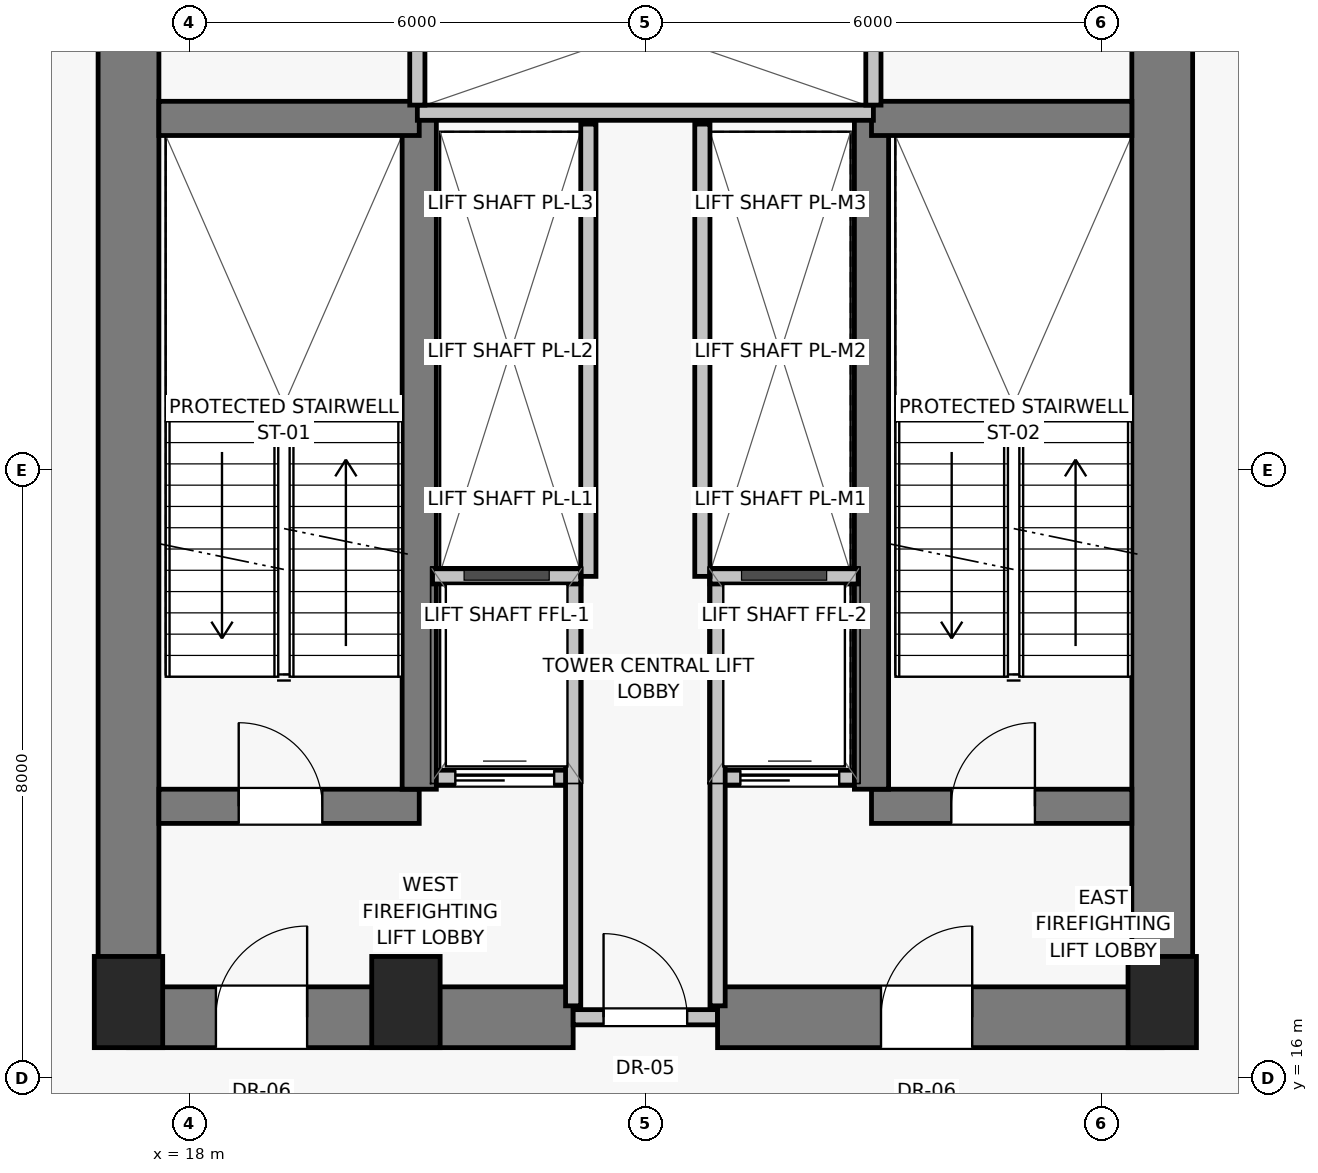
"""IFC4 building model, lengths in metres.
Left out: names, types, materials, properties, quantities, classifications, styles, units other than length and angle.
Written with IfcOpenShell. Run it as: python <this file> out.ifc"""

import sys

from ifc_helpers import new_model, si_unit, direction, frame, frame_2d, origin, origin_2d, place, context, subcontext, project, spatial, rectangle, extrude, source, transform, mapped, element, fill, save


model = new_model("IFC4")
c1 = context("Model", 3, precision=1e-05, world=origin(), true_north=direction((0.0, 1.0)))
c2 = subcontext(c1, "Body", "Model", "MODEL_VIEW")
j1 = project(units=[si_unit("LENGTHUNIT", "METRE"), si_unit("PLANEANGLEUNIT", "RADIAN")], contexts=[c1])
p1 = place(None, origin())
s1 = spatial("IfcSite", under=j1, at=p1, CompositionType="ELEMENT")
p2 = place(p1, origin())
s2 = spatial("IfcBuilding", under=s1, at=p2, CompositionType="ELEMENT")
p3 = place(p2, frame((0.0, 0.0, 18.4)))
s3 = spatial("IfcBuildingStorey", under=s2, at=p3, CompositionType="ELEMENT", Elevation=18.4)
for number, where, z_axis, x_axis in (
    (1, (17.2, 17.0, 0.0), (0.0, 0.0, 1.0), (1.0, 0.0, 0.0)),
    (2, (20.85, 17.0, 0.0), (0.0, 0.0, 1.0), (1.0, 0.0, 0.0)),
    (3, (30.8, 17.0, 0.0), (0.0, 0.0, 1.0), (1.0, 0.0, 0.0)),
):
    element("IfcColumn", number, at=place(p3, frame(where, z_axis=z_axis, x_axis=x_axis)), inside=s3, PredefinedType="PILASTER", context=c2, shape_type="SweptSolid", body=[
        extrude(rectangle(XDim=0.9, YDim=1.2, at=origin_2d()), origin(), (0.0, 0.0, 1.0), 4.4),
    ])
for number, where, z_axis, x_axis in (
    (4, (17.2, 16.8, 0.0), (0.0, 0.0, 1.0), (0.0, 1.0, 0.0)),
    (5, (30.8, 16.8, 0.0), (0.0, 0.0, 1.0), (0.0, 1.0, 0.0)),
):
    element("IfcWall", number, at=place(p3, frame(where, z_axis=z_axis, x_axis=x_axis)), inside=s3, PredefinedType="SHEAR", context=c2, shape_type="SweptSolid", body=[
        extrude(rectangle(XDim=14.2, YDim=0.8, at=frame_2d((7.1, 0.0))), origin(), (0.0, 0.0, 1.0), 4.05),
    ])
p4 = place(p3, frame((17.2, 16.8, 0.0), z_axis=(0.0, 0.0, 1.0), x_axis=(1.0, 0.0, 0.0)))
e6 = element("IfcWall", 6, at=p4, inside=s3, PredefinedType="SHEAR", context=c2, shape_type="SweptSolid", body=[
    extrude(rectangle(XDim=5.85, YDim=0.8, at=frame_2d((2.925, 0.0))), origin(), (0.0, 0.0, 1.0), 4.05),
])
p5 = place(p4, frame((1.15, 0.0, 0.0)))
e7 = element("IfcOpeningElement", 7, at=p5, cuts=e6, PredefinedType="OPENING", context=c2, shape_type="SweptSolid", body=[
    extrude(rectangle(XDim=1.2, YDim=2.03, at=frame_2d((0.6, 1.015))), frame((0.0, 0.41, 0.0), z_axis=(0.0, -1.0, 0.0), x_axis=(1.0, 0.0, 0.0)), (0.0, 0.0, 1.0), 0.82),
])
p6 = place(p3, frame((23.05, 16.8, 0.0), z_axis=(0.0, 0.0, 1.0), x_axis=(1.0, 0.0, 0.0)))
e8 = element("IfcWall", 8, at=p6, inside=s3, PredefinedType="SOLIDWALL", context=c2, shape_type="SweptSolid", body=[
    extrude(rectangle(XDim=1.9, YDim=0.2, at=frame_2d((0.95, 0.0))), origin(), (0.0, 0.0, 1.0), 3.2),
])
p7 = place(p6, frame((0.4, 0.0, 0.0)))
e9 = element("IfcOpeningElement", 9, at=p7, cuts=e8, PredefinedType="OPENING", context=c2, shape_type="SweptSolid", body=[
    extrude(rectangle(XDim=1.1, YDim=2.03, at=frame_2d((0.55, 1.015))), frame((0.0, 0.11, 0.0), z_axis=(0.0, -1.0, 0.0), x_axis=(1.0, 0.0, 0.0)), (0.0, 0.0, 1.0), 0.22),
])
p8 = place(p3, frame((24.95, 16.8, 0.0), z_axis=(0.0, 0.0, 1.0), x_axis=(1.0, 0.0, 0.0)))
e10 = element("IfcWall", 10, at=p8, inside=s3, PredefinedType="SHEAR", context=c2, shape_type="SweptSolid", body=[
    extrude(rectangle(XDim=5.85, YDim=0.8, at=frame_2d((2.925, 0.0))), origin(), (0.0, 0.0, 1.0), 4.05),
])
p9 = place(p8, frame((2.15, 0.0, 0.0)))
e11 = element("IfcOpeningElement", 11, at=p9, cuts=e10, PredefinedType="OPENING", context=c2, shape_type="SweptSolid", body=[
    extrude(rectangle(XDim=1.2, YDim=2.03, at=frame_2d((0.6, 1.015))), frame((0.0, 0.41, 0.0), z_axis=(0.0, -1.0, 0.0), x_axis=(1.0, 0.0, 0.0)), (0.0, 0.0, 1.0), 0.82),
])
p10 = place(p3, frame((17.6, 19.575, 0.0), z_axis=(0.0, 0.0, 1.0), x_axis=(1.0, 0.0, 0.0)))
e12 = element("IfcWall", 12, at=p10, inside=s3, PredefinedType="SHEAR", context=c2, shape_type="SweptSolid", body=[
    extrude(rectangle(XDim=3.425, YDim=0.45, at=frame_2d((1.712, 0.0))), origin(), (0.0, 0.0, 1.0), 4.05),
])
p11 = place(p10, frame((1.05, 0.0, 0.0)))
e13 = element("IfcOpeningElement", 13, at=p11, cuts=e12, PredefinedType="OPENING", context=c2, shape_type="SweptSolid", body=[
    extrude(rectangle(XDim=1.1, YDim=2.03, at=frame_2d((0.55, 1.015))), frame((0.0, 0.235, 0.0), z_axis=(0.0, -1.0, 0.0), x_axis=(1.0, 0.0, 0.0)), (0.0, 0.0, 1.0), 0.47),
])
p12 = place(p3, frame((21.2, 19.95, 0.0), z_axis=(0.0, 0.0, 1.0), x_axis=(1.0, 0.0, 0.0)))
e14 = element("IfcWall", 14, at=p12, inside=s3, PredefinedType="SOLIDWALL", context=c2, shape_type="SweptSolid", body=[
    extrude(rectangle(XDim=1.85, YDim=0.2, at=frame_2d((0.925, 0.0))), origin(), (0.0, 0.0, 1.0), 4.05),
])
p13 = place(p12, frame((0.3, 0.0, 0.0)))
e15 = element("IfcOpeningElement", 15, at=p13, cuts=e14, PredefinedType="OPENING", context=c2, shape_type="SweptSolid", body=[
    extrude(rectangle(XDim=1.3, YDim=2.25, at=frame_2d((0.65, 1.125))), frame((0.0, 0.11, 0.0), z_axis=(0.0, -1.0, 0.0), x_axis=(1.0, 0.0, 0.0)), (0.0, 0.0, 1.0), 0.22),
])
p14 = place(p3, frame((24.95, 19.95, 0.0), z_axis=(0.0, 0.0, 1.0), x_axis=(1.0, 0.0, 0.0)))
e16 = element("IfcWall", 16, at=p14, inside=s3, PredefinedType="SOLIDWALL", context=c2, shape_type="SweptSolid", body=[
    extrude(rectangle(XDim=1.85, YDim=0.2, at=frame_2d((0.925, 0.0))), origin(), (0.0, 0.0, 1.0), 4.05),
])
p15 = place(p14, frame((0.3, 0.0, 0.0)))
e17 = element("IfcOpeningElement", 17, at=p15, cuts=e16, PredefinedType="OPENING", context=c2, shape_type="SweptSolid", body=[
    extrude(rectangle(XDim=1.3, YDim=2.25, at=frame_2d((0.65, 1.125))), frame((0.0, 0.11, 0.0), z_axis=(0.0, -1.0, 0.0), x_axis=(1.0, 0.0, 0.0)), (0.0, 0.0, 1.0), 0.22),
])
p16 = place(p3, frame((26.975, 19.575, 0.0), z_axis=(0.0, 0.0, 1.0), x_axis=(1.0, 0.0, 0.0)))
e18 = element("IfcWall", 18, at=p16, inside=s3, PredefinedType="SHEAR", context=c2, shape_type="SweptSolid", body=[
    extrude(rectangle(XDim=3.425, YDim=0.45, at=frame_2d((1.712, 0.0))), origin(), (0.0, 0.0, 1.0), 4.05),
])
p17 = place(p16, frame((1.05, 0.0, 0.0)))
e19 = element("IfcOpeningElement", 19, at=p17, cuts=e18, PredefinedType="OPENING", context=c2, shape_type="SweptSolid", body=[
    extrude(rectangle(XDim=1.1, YDim=2.03, at=frame_2d((0.55, 1.015))), frame((0.0, 0.235, 0.0), z_axis=(0.0, -1.0, 0.0), x_axis=(1.0, 0.0, 0.0)), (0.0, 0.0, 1.0), 0.47),
])
for number, where, z_axis, x_axis in (
    (20, (21.025, 19.8, 0.0), (0.0, 0.0, 1.0), (0.0, 1.0, 0.0)),
    (21, (26.975, 19.8, 0.0), (0.0, 0.0, 1.0), (0.0, 1.0, 0.0)),
):
    element("IfcWall", number, at=place(p3, frame(where, z_axis=z_axis, x_axis=x_axis)), inside=s3, PredefinedType="SHEAR", context=c2, shape_type="SweptSolid", body=[
        extrude(rectangle(XDim=8.825, YDim=0.45, at=frame_2d((4.413, 0.0))), origin(), (0.0, 0.0, 1.0), 4.05),
    ])
for number, where, z_axis, x_axis in (
    (22, (17.6, 28.625, 0.0), (0.0, 0.0, 1.0), (1.0, 0.0, 0.0)),
    (23, (26.975, 28.625, 0.0), (0.0, 0.0, 1.0), (1.0, 0.0, 0.0)),
):
    element("IfcWall", number, at=place(p3, frame(where, z_axis=z_axis, x_axis=x_axis)), inside=s3, PredefinedType="SHEAR", context=c2, shape_type="SweptSolid", body=[
        extrude(rectangle(XDim=3.425, YDim=0.45, at=frame_2d((1.712, 0.0))), origin(), (0.0, 0.0, 1.0), 4.05),
    ])
for number, where, z_axis, x_axis in (
    (24, (23.05, 16.95, 0.0), (0.0, 0.0, 1.0), (0.0, 1.0, 0.0)),
    (25, (24.95, 16.95, 0.0), (0.0, 0.0, 1.0), (0.0, 1.0, 0.0)),
):
    element("IfcWall", number, at=place(p3, frame(where, z_axis=z_axis, x_axis=x_axis)), inside=s3, PredefinedType="SOLIDWALL", context=c2, shape_type="SweptSolid", body=[
        extrude(rectangle(XDim=5.6, YDim=0.2, at=frame_2d((2.8, 0.0))), origin(), (0.0, 0.0, 1.0), 4.05),
    ])
for number, where, z_axis, x_axis in (
    (26, (21.2, 22.6, 0.0), (0.0, 0.0, 1.0), (1.0, 0.0, 0.0)),
    (27, (24.85, 22.6, 0.0), (0.0, 0.0, 1.0), (1.0, 0.0, 0.0)),
):
    element("IfcWall", number, at=place(p3, frame(where, z_axis=z_axis, x_axis=x_axis)), inside=s3, PredefinedType="SOLIDWALL", context=c2, shape_type="SweptSolid", body=[
        extrude(rectangle(XDim=1.95, YDim=0.2, at=frame_2d((0.975, 0.0))), origin(), (0.0, 0.0, 1.0), 4.05),
    ])
p18 = place(p3, frame((21.0, 28.7, 0.0), z_axis=(0.0, 0.0, 1.0), x_axis=(1.0, 0.0, 0.0)))
e28 = element("IfcWall", 28, at=p18, inside=s3, PredefinedType="SOLIDWALL", context=c2, shape_type="SweptSolid", body=[
    extrude(rectangle(XDim=6.0, YDim=0.2, at=frame_2d((3.0, 0.0))), origin(), (0.0, 0.0, 1.0), 4.05),
])
p19 = place(p3, frame((21.0, 28.8, 0.0), z_axis=(0.0, 0.0, 1.0), x_axis=(0.0, 1.0, 0.0)))
e29 = element("IfcWall", 29, at=p19, inside=s3, PredefinedType="SOLIDWALL", context=c2, shape_type="SweptSolid", body=[
    extrude(rectangle(XDim=1.6, YDim=0.2, at=frame_2d((0.8, 0.0))), origin(), (0.0, 0.0, 1.0), 4.05),
])
p20 = place(p3, frame((27.0, 28.8, 0.0), z_axis=(0.0, 0.0, 1.0), x_axis=(0.0, 1.0, 0.0)))
e30 = element("IfcWall", 30, at=p20, inside=s3, PredefinedType="SOLIDWALL", context=c2, shape_type="SweptSolid", body=[
    extrude(rectangle(XDim=2.0, YDim=0.2, at=frame_2d((1.0, 0.0))), origin(), (0.0, 0.0, 1.0), 4.05),
])
for number, where, z_axis, x_axis in (
    (31, (23.25, 22.6, 0.0), (0.0, 0.0, 1.0), (0.0, 1.0, 0.0)),
    (32, (24.75, 22.6, 0.0), (0.0, 0.0, 1.0), (0.0, 1.0, 0.0)),
):
    element("IfcWall", number, at=place(p3, frame(where, z_axis=z_axis, x_axis=x_axis)), inside=s3, PredefinedType="SOLIDWALL", context=c2, shape_type="SweptSolid", body=[
        extrude(rectangle(XDim=5.95, YDim=0.2, at=frame_2d((2.975, 0.0))), origin(), (0.0, 0.0, 1.0), 4.05),
    ])
m1 = source(origin(), c2, "Body", "SweptSolid", [
    extrude(rectangle(XDim=1.2, YDim=2.03, at=frame_2d((0.6, 1.015))), frame((0.0, 0.025, 0.0), z_axis=(0.0, -1.0, 0.0), x_axis=(1.0, 0.0, 0.0)), (0.0, 0.0, 1.0), 0.05),
])
p21 = place(p5, origin())
e33 = element("IfcDoor", 33, at=p21, inside=s3, OperationType="SINGLE_SWING_RIGHT", PredefinedType="DOOR", context=c2, shape_type="MappedRepresentation", body=[
    mapped(m1, transform((0.0, 0.0, 0.0), scale=1.0)),
])
fill(e7, e33)
m2 = source(origin(), c2, "Body", "SweptSolid", [
    extrude(rectangle(XDim=1.1, YDim=2.03, at=frame_2d((0.55, 1.015))), frame((0.0, 0.025, 0.0), z_axis=(0.0, -1.0, 0.0), x_axis=(1.0, 0.0, 0.0)), (0.0, 0.0, 1.0), 0.05),
])
p22 = place(p7, origin())
e34 = element("IfcDoor", 34, at=p22, inside=s3, OperationType="SINGLE_SWING_LEFT", PredefinedType="DOOR", context=c2, shape_type="MappedRepresentation", body=[
    mapped(m2, transform((0.0, 0.0, 0.0), scale=1.0)),
])
fill(e9, e34)
p23 = place(p9, origin())
e35 = element("IfcDoor", 35, at=p23, inside=s3, OperationType="SINGLE_SWING_RIGHT", PredefinedType="DOOR", context=c2, shape_type="MappedRepresentation", body=[
    mapped(m1, transform((0.0, 0.0, 0.0), scale=1.0)),
])
fill(e11, e35)
p24 = place(p11, origin())
e36 = element("IfcDoor", 36, at=p24, inside=s3, OperationType="SINGLE_SWING_LEFT", PredefinedType="DOOR", context=c2, shape_type="MappedRepresentation", body=[
    mapped(m2, transform((0.0, 0.0, 0.0), scale=1.0)),
])
fill(e13, e36)
m3 = source(origin(), c2, "Body", "SweptSolid", [
    extrude(rectangle(XDim=1.3, YDim=2.25, at=frame_2d((0.65, 1.125))), frame((0.0, 0.025, 0.0), z_axis=(0.0, -1.0, 0.0), x_axis=(1.0, 0.0, 0.0)), (0.0, 0.0, 1.0), 0.05),
])
p25 = place(p13, origin())
e37 = element("IfcDoor", 37, at=p25, inside=s3, OperationType="SLIDING_TO_LEFT", PredefinedType="DOOR", context=c2, shape_type="MappedRepresentation", body=[
    mapped(m3, transform((0.0, 0.0, 0.0), scale=1.0)),
])
fill(e15, e37)
p26 = place(p15, origin())
e38 = element("IfcDoor", 38, at=p26, inside=s3, OperationType="SLIDING_TO_LEFT", PredefinedType="DOOR", context=c2, shape_type="MappedRepresentation", body=[
    mapped(m3, transform((0.0, 0.0, 0.0), scale=1.0)),
])
fill(e17, e38)
p27 = place(p17, origin())
e39 = element("IfcDoor", 39, at=p27, inside=s3, OperationType="SINGLE_SWING_RIGHT", PredefinedType="DOOR", context=c2, shape_type="MappedRepresentation", body=[
    mapped(m2, transform((0.0, 0.0, 0.0), scale=1.0)),
])
fill(e19, e39)
save(model, sys.argv[1])
